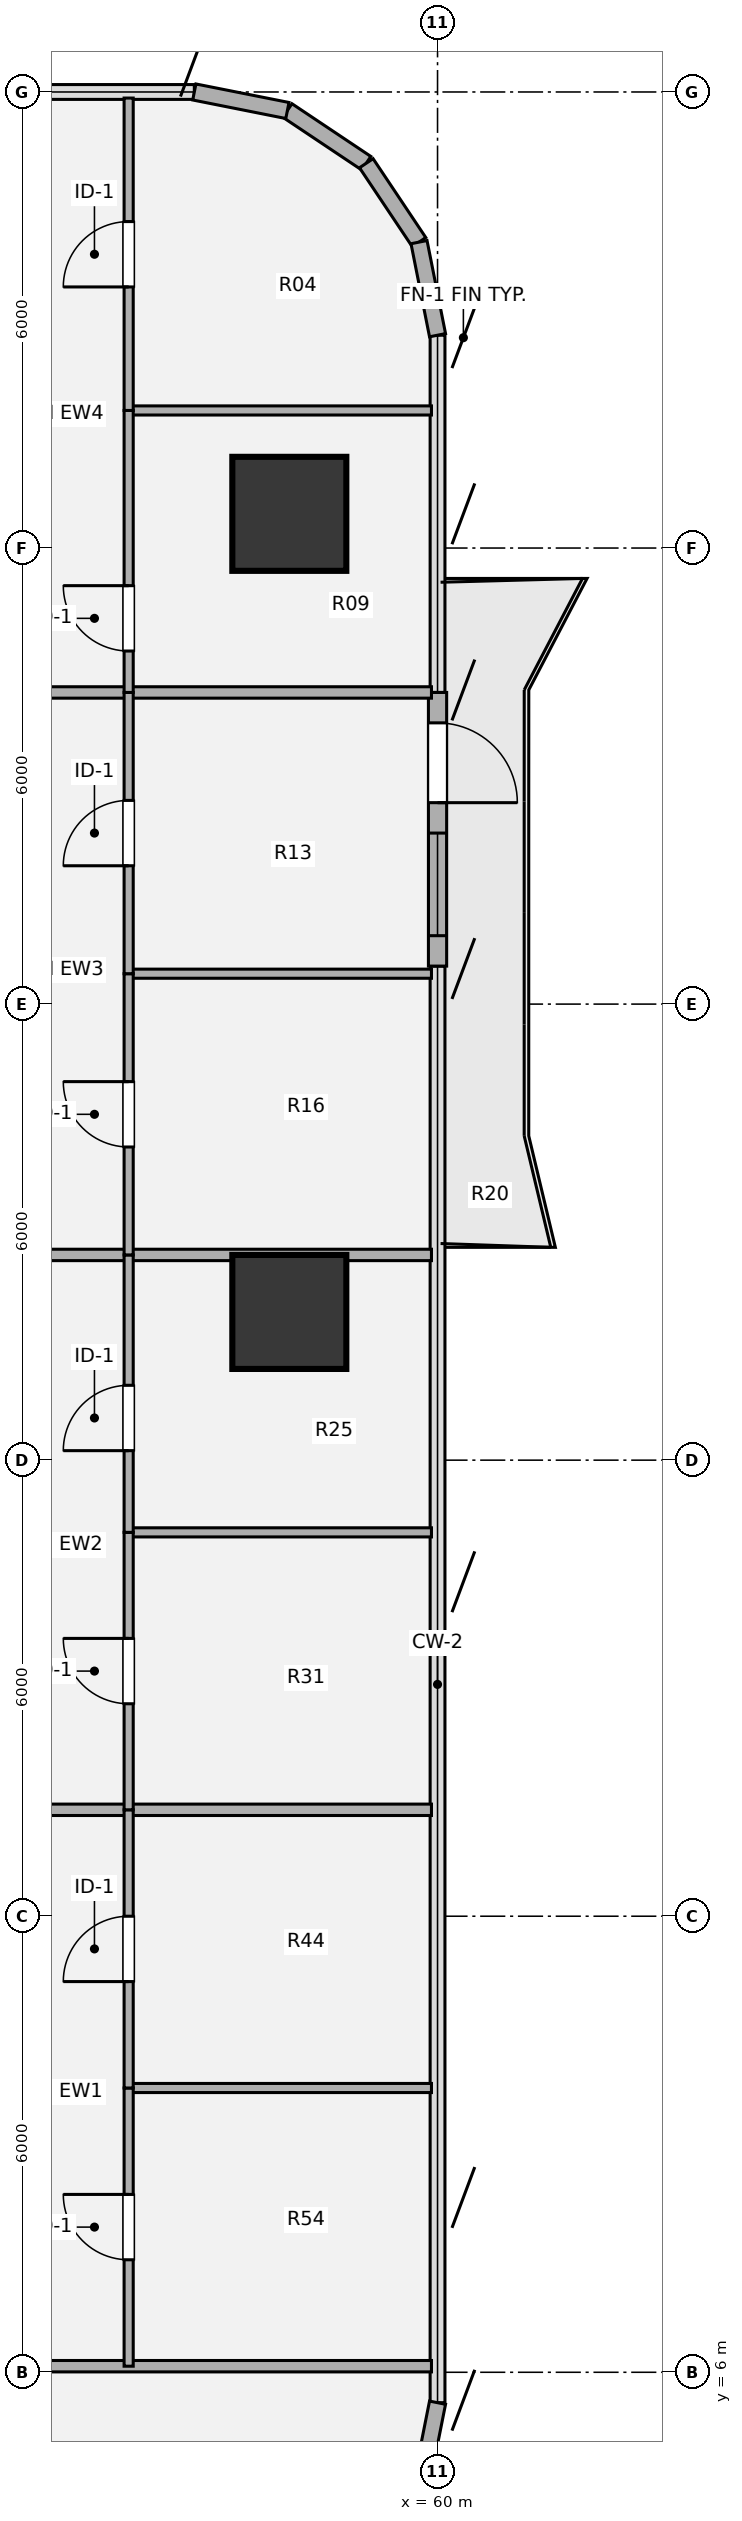
"""IFC4 building model, lengths in metres.
Left out: names, types, materials, properties, quantities, classifications, styles, units other than length and angle.
Written with IfcOpenShell. Run it as: python <this file> out.ifc"""

import sys

from ifc_helpers import new_model, si_unit, direction, frame, frame_2d, origin, origin_2d, place, context, subcontext, project, spatial, rectangle, hollow_circle, extrude, source, transform, mapped, element, fill, save


model = new_model("IFC4")
c1 = context("Model", 3, precision=1e-05, world=origin(), true_north=direction((0.0, 1.0)))
c2 = subcontext(c1, "Body", "Model", "MODEL_VIEW")
j1 = project(units=[si_unit("LENGTHUNIT", "METRE"), si_unit("PLANEANGLEUNIT", "RADIAN")], contexts=[c1])
p1 = place(None, origin())
s1 = spatial("IfcSite", under=j1, at=p1, CompositionType="ELEMENT")
p2 = place(p1, origin())
s2 = spatial("IfcBuilding", under=s1, at=p2, CompositionType="ELEMENT")
p3 = place(p2, frame((0.0, 0.0, 30.78)))
s3 = spatial("IfcBuildingStorey", under=s2, at=p3, CompositionType="ELEMENT", Elevation=30.78)
m1 = source(origin(), c2, "Body", "SweptSolid", [
    extrude(hollow_circle(Radius=0.75, WallThickness=0.05, at=origin_2d()), origin(), (0.0, 0.0, 1.0), 3.78),
])
for number, where, z_axis, x_axis in (
    (1, (58.05, 19.95, 0.0), (0.0, 0.0, 1.0), (1.0, 0.0, 0.0)),
    (2, (58.05, 30.45, 0.0), (0.0, 0.0, 1.0), (1.0, 0.0, 0.0)),
):
    element("IfcColumn", number, at=place(p3, frame(where, z_axis=z_axis, x_axis=x_axis)), inside=s3, PredefinedType="COLUMN", context=c2, shape_type="MappedRepresentation", body=[
        mapped(m1, transform((0.0, 0.0, 0.0), x_axis=(1.0, 0.0, 0.0), y_axis=(0.0, 1.0, 0.0), z_axis=(0.0, 0.0, 1.0), scale=1.0)),
    ])
for number, where, z_axis, x_axis in (
    (3, (58.025, 35.756, 0.0), (0.0, 0.0, 1.0), (0.831, -0.556, 0.0)),
    (4, (59.063, 35.063, 0.0), (0.0, 0.0, 1.0), (0.556, -0.831, 0.0)),
    (5, (59.756, 34.025, 0.0), (0.0, 0.0, 1.0), (0.195, -0.981, 0.0)),
):
    element("IfcWall", number, at=place(p3, frame(where, z_axis=z_axis, x_axis=x_axis)), inside=s3, PredefinedType="SOLIDWALL", context=c2, shape_type="SweptSolid", body=[
        extrude(rectangle(XDim=1.249, YDim=0.215, at=frame_2d((0.624, 0.0))), origin(), (0.0, 0.0, 1.0), 3.53),
    ])
p4 = place(p3, frame((60.0, 28.1, 0.0), z_axis=(0.0, 0.0, 1.0), x_axis=(0.0, -1.0, 0.0)))
e6 = element("IfcWall", 6, at=p4, inside=s3, PredefinedType="SOLIDWALL", context=c2, shape_type="SweptSolid", body=[
    extrude(rectangle(XDim=3.6, YDim=0.24, at=frame_2d((1.8, 0.0))), origin(), (0.0, 0.0, 1.0), 3.53),
])
p5 = place(p4, frame((0.4, 0.0, 0.0)))
e7 = element("IfcOpeningElement", 7, at=p5, cuts=e6, PredefinedType="OPENING", context=c2, shape_type="SweptSolid", body=[
    extrude(rectangle(XDim=1.05, YDim=2.15, at=origin_2d()), frame((0.525, 0.13, 1.075), z_axis=(0.0, -1.0, 0.0), x_axis=(1.0, 0.0, 0.0)), (0.0, 0.0, 1.0), 0.26),
])
p6 = place(p4, frame((1.85, 0.0, 0.85)))
e8 = element("IfcOpeningElement", 8, at=p6, cuts=e6, PredefinedType="OPENING", context=c2, shape_type="SweptSolid", body=[
    extrude(rectangle(XDim=1.35, YDim=1.35, at=origin_2d()), frame((0.675, 0.13, 0.675), z_axis=(0.0, -1.0, 0.0), x_axis=(1.0, 0.0, 0.0)), (0.0, 0.0, 1.0), 0.26),
])
for number, where, z_axis, x_axis in (
    (9, (60.0, 5.6, 0.0), (0.0, 0.0, 1.0), (-0.195, -0.981, 0.0)),
    (10, (56.8, 36.0, 0.0), (0.0, 0.0, 1.0), (0.981, -0.195, 0.0)),
):
    element("IfcWall", number, at=place(p3, frame(where, z_axis=z_axis, x_axis=x_axis)), inside=s3, PredefinedType="SOLIDWALL", context=c2, shape_type="SweptSolid", body=[
        extrude(rectangle(XDim=1.249, YDim=0.215, at=frame_2d((0.624, 0.0))), origin(), (0.0, 0.0, 1.0), 3.53),
    ])
p7 = place(p3, frame((49.9, 6.08, 0.0), z_axis=(0.0, 0.0, 1.0), x_axis=(1.0, 0.0, 0.0)))
e11 = element("IfcWall", 11, at=p7, inside=s3, PredefinedType="PARTITIONING", context=c2, shape_type="SweptSolid", body=[
    extrude(rectangle(XDim=10.02, YDim=0.15, at=frame_2d((5.01, 0.0))), origin(), (0.0, 0.0, 1.0), 3.5),
])
p8 = place(p3, frame((55.936, 9.74, 0.0), z_axis=(0.0, 0.0, 1.0), x_axis=(1.0, 0.0, 0.0)))
e12 = element("IfcWall", 12, at=p8, inside=s3, PredefinedType="PARTITIONING", context=c2, shape_type="SweptSolid", body=[
    extrude(rectangle(XDim=3.984, YDim=0.12, at=frame_2d((1.992, 0.0))), origin(), (0.0, 0.0, 1.0), 3.5),
])
p9 = place(p3, frame((49.9, 13.4, 0.0), z_axis=(0.0, 0.0, 1.0), x_axis=(1.0, 0.0, 0.0)))
e13 = element("IfcWall", 13, at=p9, inside=s3, PredefinedType="PARTITIONING", context=c2, shape_type="SweptSolid", body=[
    extrude(rectangle(XDim=10.02, YDim=0.15, at=frame_2d((5.01, 0.0))), origin(), (0.0, 0.0, 1.0), 3.5),
])
p10 = place(p3, frame((55.936, 17.05, 0.0), z_axis=(0.0, 0.0, 1.0), x_axis=(1.0, 0.0, 0.0)))
e14 = element("IfcWall", 14, at=p10, inside=s3, PredefinedType="PARTITIONING", context=c2, shape_type="SweptSolid", body=[
    extrude(rectangle(XDim=3.984, YDim=0.12, at=frame_2d((1.992, 0.0))), origin(), (0.0, 0.0, 1.0), 3.5),
])
p11 = place(p3, frame((49.9, 20.7, 0.0), z_axis=(0.0, 0.0, 1.0), x_axis=(1.0, 0.0, 0.0)))
e15 = element("IfcWall", 15, at=p11, inside=s3, PredefinedType="PARTITIONING", context=c2, shape_type="SweptSolid", body=[
    extrude(rectangle(XDim=10.02, YDim=0.15, at=frame_2d((5.01, 0.0))), origin(), (0.0, 0.0, 1.0), 2.982),
])
p12 = place(p3, frame((55.936, 24.4, 0.0), z_axis=(0.0, 0.0, 1.0), x_axis=(1.0, 0.0, 0.0)))
e16 = element("IfcWall", 16, at=p12, inside=s3, PredefinedType="PARTITIONING", context=c2, shape_type="SweptSolid", body=[
    extrude(rectangle(XDim=3.984, YDim=0.12, at=frame_2d((1.992, 0.0))), origin(), (0.0, 0.0, 1.0), 2.982),
])
p13 = place(p3, frame((49.9, 28.1, 0.0), z_axis=(0.0, 0.0, 1.0), x_axis=(1.0, 0.0, 0.0)))
e17 = element("IfcWall", 17, at=p13, inside=s3, PredefinedType="PARTITIONING", context=c2, shape_type="SweptSolid", body=[
    extrude(rectangle(XDim=10.02, YDim=0.15, at=frame_2d((5.01, 0.0))), origin(), (0.0, 0.0, 1.0), 2.982),
])
p14 = place(p3, frame((55.936, 31.81, 0.0), z_axis=(0.0, 0.0, 1.0), x_axis=(1.0, 0.0, 0.0)))
e18 = element("IfcWall", 18, at=p14, inside=s3, PredefinedType="PARTITIONING", context=c2, shape_type="SweptSolid", body=[
    extrude(rectangle(XDim=3.984, YDim=0.12, at=frame_2d((1.992, 0.0))), origin(), (0.0, 0.0, 1.0), 3.5),
])
p15 = place(p3, frame((55.936, 6.08, 0.0), z_axis=(0.0, 0.0, 1.0), x_axis=(0.0, 1.0, 0.0)))
e19 = element("IfcWall", 19, at=p15, inside=s3, PredefinedType="PARTITIONING", context=c2, shape_type="SweptSolid", body=[
    extrude(rectangle(XDim=3.66, YDim=0.12, at=frame_2d((1.83, 0.0))), origin(), (0.0, 0.0, 1.0), 3.5),
])
p16 = place(p15, frame((1.4, 0.0, 0.0)))
e20 = element("IfcOpeningElement", 20, at=p16, cuts=e19, PredefinedType="OPENING", context=c2, shape_type="SweptSolid", body=[
    extrude(rectangle(XDim=0.86, YDim=2.1, at=origin_2d()), frame((0.43, 0.07, 1.05), z_axis=(0.0, -1.0, 0.0), x_axis=(1.0, 0.0, 0.0)), (0.0, 0.0, 1.0), 0.14),
])
p17 = place(p3, frame((55.936, 9.74, 0.0), z_axis=(0.0, 0.0, 1.0), x_axis=(0.0, 1.0, 0.0)))
e21 = element("IfcWall", 21, at=p17, inside=s3, PredefinedType="PARTITIONING", context=c2, shape_type="SweptSolid", body=[
    extrude(rectangle(XDim=3.66, YDim=0.12, at=frame_2d((1.83, 0.0))), origin(), (0.0, 0.0, 1.0), 3.5),
])
p18 = place(p17, frame((1.4, 0.0, 0.0)))
e22 = element("IfcOpeningElement", 22, at=p18, cuts=e21, PredefinedType="OPENING", context=c2, shape_type="SweptSolid", body=[
    extrude(rectangle(XDim=0.86, YDim=2.1, at=origin_2d()), frame((0.43, 0.07, 1.05), z_axis=(0.0, -1.0, 0.0), x_axis=(1.0, 0.0, 0.0)), (0.0, 0.0, 1.0), 0.14),
])
p19 = place(p3, frame((55.936, 13.4, 0.0), z_axis=(0.0, 0.0, 1.0), x_axis=(0.0, 1.0, 0.0)))
e23 = element("IfcWall", 23, at=p19, inside=s3, PredefinedType="PARTITIONING", context=c2, shape_type="SweptSolid", body=[
    extrude(rectangle(XDim=3.65, YDim=0.12, at=frame_2d((1.825, 0.0))), origin(), (0.0, 0.0, 1.0), 3.5),
])
p20 = place(p19, frame((1.395, 0.0, 0.0)))
e24 = element("IfcOpeningElement", 24, at=p20, cuts=e23, PredefinedType="OPENING", context=c2, shape_type="SweptSolid", body=[
    extrude(rectangle(XDim=0.86, YDim=2.1, at=origin_2d()), frame((0.43, 0.07, 1.05), z_axis=(0.0, -1.0, 0.0), x_axis=(1.0, 0.0, 0.0)), (0.0, 0.0, 1.0), 0.14),
])
p21 = place(p3, frame((55.936, 17.05, 0.0), z_axis=(0.0, 0.0, 1.0), x_axis=(0.0, 1.0, 0.0)))
e25 = element("IfcWall", 25, at=p21, inside=s3, PredefinedType="PARTITIONING", context=c2, shape_type="SweptSolid", body=[
    extrude(rectangle(XDim=3.65, YDim=0.12, at=frame_2d((1.825, 0.0))), origin(), (0.0, 0.0, 1.0), 3.5),
])
p22 = place(p21, frame((1.075, 0.0, 0.0)))
e26 = element("IfcOpeningElement", 26, at=p22, cuts=e25, PredefinedType="OPENING", context=c2, shape_type="SweptSolid", body=[
    extrude(rectangle(XDim=0.86, YDim=2.1, at=origin_2d()), frame((0.43, 0.07, 1.05), z_axis=(0.0, -1.0, 0.0), x_axis=(1.0, 0.0, 0.0)), (0.0, 0.0, 1.0), 0.14),
])
p23 = place(p3, frame((55.936, 20.7, 0.0), z_axis=(0.0, 0.0, 1.0), x_axis=(0.0, 1.0, 0.0)))
e27 = element("IfcWall", 27, at=p23, inside=s3, PredefinedType="PARTITIONING", context=c2, shape_type="SweptSolid", body=[
    extrude(rectangle(XDim=3.7, YDim=0.12, at=frame_2d((1.85, 0.0))), origin(), (0.0, 0.0, 1.0), 3.5),
])
p24 = place(p23, frame((1.42, 0.0, 0.0)))
e28 = element("IfcOpeningElement", 28, at=p24, cuts=e27, PredefinedType="OPENING", context=c2, shape_type="SweptSolid", body=[
    extrude(rectangle(XDim=0.86, YDim=2.1, at=origin_2d()), frame((0.43, 0.07, 1.05), z_axis=(0.0, -1.0, 0.0), x_axis=(1.0, 0.0, 0.0)), (0.0, 0.0, 1.0), 0.14),
])
p25 = place(p3, frame((55.936, 24.4, 0.0), z_axis=(0.0, 0.0, 1.0), x_axis=(0.0, 1.0, 0.0)))
e29 = element("IfcWall", 29, at=p25, inside=s3, PredefinedType="PARTITIONING", context=c2, shape_type="SweptSolid", body=[
    extrude(rectangle(XDim=3.7, YDim=0.12, at=frame_2d((1.85, 0.0))), origin(), (0.0, 0.0, 1.0), 3.5),
])
p26 = place(p25, frame((1.42, 0.0, 0.0)))
e30 = element("IfcOpeningElement", 30, at=p26, cuts=e29, PredefinedType="OPENING", context=c2, shape_type="SweptSolid", body=[
    extrude(rectangle(XDim=0.86, YDim=2.1, at=origin_2d()), frame((0.43, 0.07, 1.05), z_axis=(0.0, -1.0, 0.0), x_axis=(1.0, 0.0, 0.0)), (0.0, 0.0, 1.0), 0.14),
])
p27 = place(p3, frame((55.936, 28.1, 0.0), z_axis=(0.0, 0.0, 1.0), x_axis=(0.0, 1.0, 0.0)))
e31 = element("IfcWall", 31, at=p27, inside=s3, PredefinedType="PARTITIONING", context=c2, shape_type="SweptSolid", body=[
    extrude(rectangle(XDim=3.71, YDim=0.12, at=frame_2d((1.855, 0.0))), origin(), (0.0, 0.0, 1.0), 3.5),
])
p28 = place(p27, frame((0.545, 0.0, 0.0)))
e32 = element("IfcOpeningElement", 32, at=p28, cuts=e31, PredefinedType="OPENING", context=c2, shape_type="SweptSolid", body=[
    extrude(rectangle(XDim=0.86, YDim=2.1, at=origin_2d()), frame((0.43, 0.07, 1.05), z_axis=(0.0, -1.0, 0.0), x_axis=(1.0, 0.0, 0.0)), (0.0, 0.0, 1.0), 0.14),
])
p29 = place(p3, frame((55.936, 31.81, 0.0), z_axis=(0.0, 0.0, 1.0), x_axis=(0.0, 1.0, 0.0)))
e33 = element("IfcWall", 33, at=p29, inside=s3, PredefinedType="PARTITIONING", context=c2, shape_type="SweptSolid", body=[
    extrude(rectangle(XDim=4.11, YDim=0.12, at=frame_2d((2.055, 0.0))), origin(), (0.0, 0.0, 1.0), 3.5),
])
p30 = place(p29, frame((1.625, 0.0, 0.0)))
e34 = element("IfcOpeningElement", 34, at=p30, cuts=e33, PredefinedType="OPENING", context=c2, shape_type="SweptSolid", body=[
    extrude(rectangle(XDim=0.86, YDim=2.1, at=origin_2d()), frame((0.43, 0.07, 1.05), z_axis=(0.0, -1.0, 0.0), x_axis=(1.0, 0.0, 0.0)), (0.0, 0.0, 1.0), 0.14),
])
m2 = source(origin(), c2, "Body", "SweptSolid", [
    extrude(rectangle(XDim=1.05, YDim=2.15, at=origin_2d()), frame((0.525, 0.025, 1.075), z_axis=(0.0, -1.0, 0.0), x_axis=(1.0, 0.0, 0.0)), (0.0, 0.0, 1.0), 0.05),
])
p31 = place(p5, origin())
e35 = element("IfcDoor", 35, at=p31, inside=s3, OperationType="SINGLE_SWING_RIGHT", PredefinedType="DOOR", context=c2, shape_type="MappedRepresentation", body=[
    mapped(m2, transform((0.0, 0.0, 0.0), x_axis=(1.0, 0.0, 0.0), y_axis=(0.0, 1.0, 0.0), z_axis=(0.0, 0.0, 1.0), scale=1.0)),
])
fill(e7, e35)
m3 = source(origin(), c2, "Body", "SweptSolid", [
    extrude(rectangle(XDim=1.35, YDim=1.35, at=origin_2d()), frame((0.675, 0.03, 0.675), z_axis=(0.0, -1.0, 0.0), x_axis=(1.0, 0.0, 0.0)), (0.0, 0.0, 1.0), 0.06),
])
p32 = place(p6, origin())
e36 = element("IfcWindow", 36, at=p32, inside=s3, PartitioningType="SINGLE_PANEL", PredefinedType="WINDOW", context=c2, shape_type="MappedRepresentation", body=[
    mapped(m3, transform((0.0, 0.0, 0.0), x_axis=(1.0, 0.0, 0.0), y_axis=(0.0, 1.0, 0.0), z_axis=(0.0, 0.0, 1.0), scale=1.0)),
])
fill(e8, e36)
m4 = source(origin(), c2, "Body", "SweptSolid", [
    extrude(rectangle(XDim=0.86, YDim=2.1, at=origin_2d()), frame((0.43, 0.025, 1.05), z_axis=(0.0, -1.0, 0.0), x_axis=(1.0, 0.0, 0.0)), (0.0, 0.0, 1.0), 0.05),
])
p33 = place(p16, origin())
e37 = element("IfcDoor", 37, at=p33, inside=s3, OperationType="SINGLE_SWING_RIGHT", PredefinedType="DOOR", context=c2, shape_type="MappedRepresentation", body=[
    mapped(m4, transform((0.0, 0.0, 0.0), x_axis=(1.0, 0.0, 0.0), y_axis=(0.0, 1.0, 0.0), z_axis=(0.0, 0.0, 1.0), scale=1.0)),
])
fill(e20, e37)
p34 = place(p18, origin())
e38 = element("IfcDoor", 38, at=p34, inside=s3, OperationType="SINGLE_SWING_LEFT", PredefinedType="DOOR", context=c2, shape_type="MappedRepresentation", body=[
    mapped(m4, transform((0.0, 0.0, 0.0), x_axis=(1.0, 0.0, 0.0), y_axis=(0.0, 1.0, 0.0), z_axis=(0.0, 0.0, 1.0), scale=1.0)),
])
fill(e22, e38)
p35 = place(p20, origin())
e39 = element("IfcDoor", 39, at=p35, inside=s3, OperationType="SINGLE_SWING_RIGHT", PredefinedType="DOOR", context=c2, shape_type="MappedRepresentation", body=[
    mapped(m4, transform((0.0, 0.0, 0.0), x_axis=(1.0, 0.0, 0.0), y_axis=(0.0, 1.0, 0.0), z_axis=(0.0, 0.0, 1.0), scale=1.0)),
])
fill(e24, e39)
p36 = place(p22, origin())
e40 = element("IfcDoor", 40, at=p36, inside=s3, OperationType="SINGLE_SWING_LEFT", PredefinedType="DOOR", context=c2, shape_type="MappedRepresentation", body=[
    mapped(m4, transform((0.0, 0.0, 0.0), x_axis=(1.0, 0.0, 0.0), y_axis=(0.0, 1.0, 0.0), z_axis=(0.0, 0.0, 1.0), scale=1.0)),
])
fill(e26, e40)
p37 = place(p24, origin())
e41 = element("IfcDoor", 41, at=p37, inside=s3, OperationType="SINGLE_SWING_RIGHT", PredefinedType="DOOR", context=c2, shape_type="MappedRepresentation", body=[
    mapped(m4, transform((0.0, 0.0, 0.0), x_axis=(1.0, 0.0, 0.0), y_axis=(0.0, 1.0, 0.0), z_axis=(0.0, 0.0, 1.0), scale=1.0)),
])
fill(e28, e41)
p38 = place(p26, origin())
e42 = element("IfcDoor", 42, at=p38, inside=s3, OperationType="SINGLE_SWING_LEFT", PredefinedType="DOOR", context=c2, shape_type="MappedRepresentation", body=[
    mapped(m4, transform((0.0, 0.0, 0.0), x_axis=(1.0, 0.0, 0.0), y_axis=(0.0, 1.0, 0.0), z_axis=(0.0, 0.0, 1.0), scale=1.0)),
])
fill(e30, e42)
p39 = place(p28, origin())
e43 = element("IfcDoor", 43, at=p39, inside=s3, OperationType="SINGLE_SWING_RIGHT", PredefinedType="DOOR", context=c2, shape_type="MappedRepresentation", body=[
    mapped(m4, transform((0.0, 0.0, 0.0), x_axis=(1.0, 0.0, 0.0), y_axis=(0.0, 1.0, 0.0), z_axis=(0.0, 0.0, 1.0), scale=1.0)),
])
fill(e32, e43)
p40 = place(p30, origin())
e44 = element("IfcDoor", 44, at=p40, inside=s3, OperationType="SINGLE_SWING_LEFT", PredefinedType="DOOR", context=c2, shape_type="MappedRepresentation", body=[
    mapped(m4, transform((0.0, 0.0, 0.0), x_axis=(1.0, 0.0, 0.0), y_axis=(0.0, 1.0, 0.0), z_axis=(0.0, 0.0, 1.0), scale=1.0)),
])
fill(e34, e44)
save(model, sys.argv[1])
